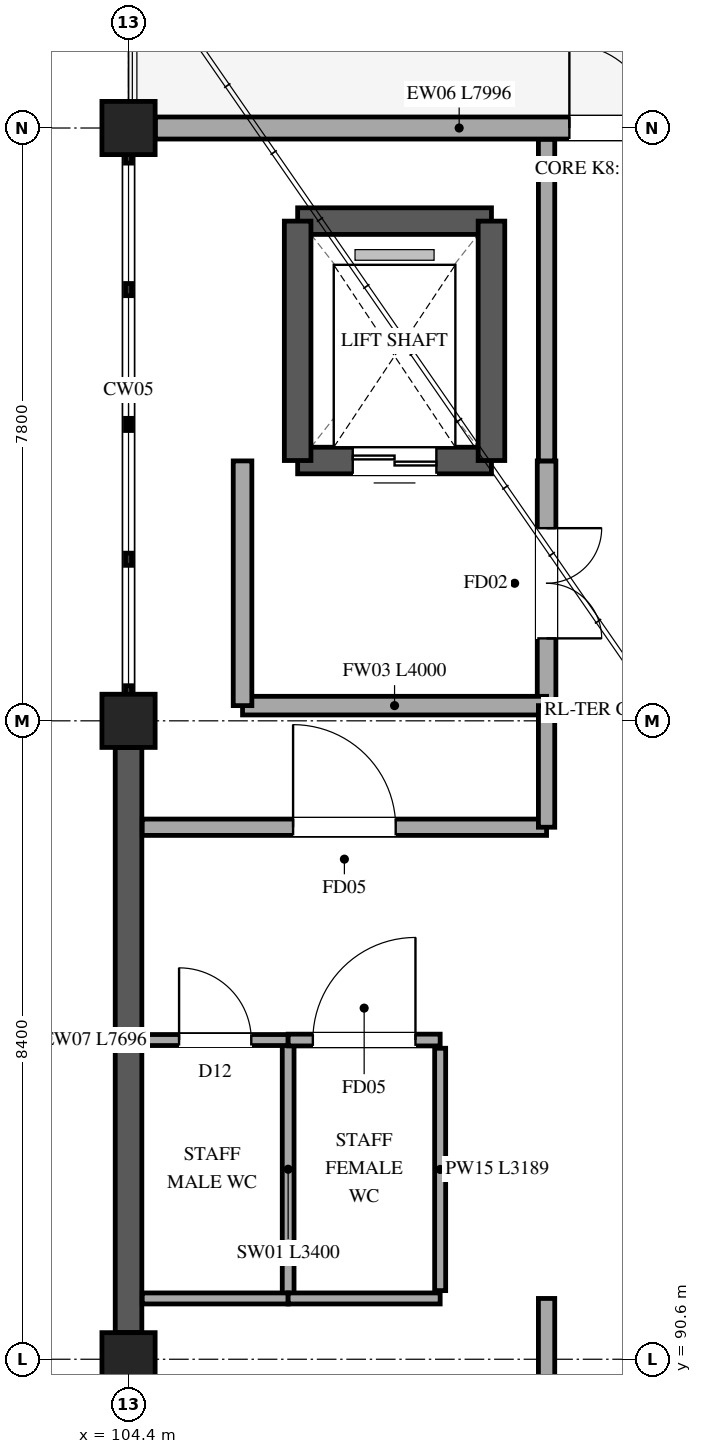
"""IFC4 building model, lengths in metres.
Left out: names, types, materials, properties, quantities, classifications, styles, units other than length and angle.
Written with IfcOpenShell. Run it as: python <this file> out.ifc"""

import sys

from ifc_helpers import new_model, si_unit, direction, frame, frame_2d, origin, origin_2d, place, context, subcontext, project, spatial, rectangle, extrude, element, fill, save


model = new_model("IFC4")
c1 = context("Model", 3, precision=1e-05, world=origin(), true_north=direction((0.0, 1.0)))
c2 = subcontext(c1, "Body", "Model", "MODEL_VIEW")
j1 = project(units=[si_unit("LENGTHUNIT", "METRE"), si_unit("PLANEANGLEUNIT", "RADIAN")], contexts=[c1])
p1 = place(None, origin())
s1 = spatial("IfcSite", under=j1, at=p1, CompositionType="ELEMENT")
p2 = place(p1, origin())
s2 = spatial("IfcBuilding", under=s1, at=p2, CompositionType="ELEMENT")
p3 = place(p2, frame((0.0, 0.0, 26.7)))
s3 = spatial("IfcBuildingStorey", under=s2, at=p3, CompositionType="ELEMENT", Elevation=26.7)
for number, where, z_axis, x_axis in (
    (1, (104.4, 90.6, 0.0), (0.0, 0.0, 1.0), (1.0, 0.0, 0.0)),
    (2, (104.4, 99.0, 0.0), (0.0, 0.0, 1.0), (1.0, 0.0, 0.0)),
    (3, (104.4, 106.8, 0.0), (0.0, 0.0, 1.0), (1.0, 0.0, 0.0)),
):
    element("IfcColumn", number, at=place(p3, frame(where, z_axis=z_axis, x_axis=x_axis)), inside=s3, PredefinedType="COLUMN", context=c2, shape_type="SweptSolid", body=[
        extrude(rectangle(XDim=0.7, YDim=0.7, at=origin_2d()), origin(), (0.0, 0.0, 1.0), 4.8),
    ])
p4 = place(p3, frame((104.4, 90.952, 0.0), z_axis=(0.0, 0.0, 1.0), x_axis=(0.0, 1.0, 0.0)))
e4 = element("IfcWall", 4, at=p4, inside=s3, PredefinedType="STANDARD", context=c2, shape_type="SweptSolid", body=[
    extrude(rectangle(XDim=7.696, YDim=0.35, at=frame_2d((3.848, 0.0))), origin(), (0.0, 0.0, 1.0), 4.49),
])
p5 = place(p3, frame((104.752, 106.8, 0.0), z_axis=(0.0, 0.0, 1.0), x_axis=(1.0, 0.0, 0.0)))
e5 = element("IfcWall", 5, at=p5, inside=s3, PredefinedType="STANDARD", context=c2, shape_type="SweptSolid", body=[
    extrude(rectangle(XDim=7.996, YDim=0.29, at=frame_2d((3.998, 0.0))), origin(), (0.0, 0.0, 1.0), 3.97),
])
p6 = place(p5, frame((5.448, 0.0, 0.0)))
e6 = element("IfcOpeningElement", 6, at=p6, cuts=e5, PredefinedType="OPENING", context=c2, shape_type="SweptSolid", body=[
    extrude(rectangle(XDim=1.1, YDim=2.2, at=frame_2d((0.55, 1.1))), frame((0.0, 0.155, 0.0), z_axis=(0.0, -1.0, 0.0), x_axis=(1.0, 0.0, 0.0)), (0.0, 0.0, 1.0), 0.31),
])
p7 = place(p3, frame((106.625, 105.575, 0.0), z_axis=(0.0, 0.0, 1.0), x_axis=(1.0, 0.0, 0.0)))
e7 = element("IfcWall", 7, at=p7, inside=s3, PredefinedType="SHEAR", context=c2, shape_type="SweptSolid", body=[
    extrude(rectangle(XDim=2.55, YDim=0.35, at=frame_2d((1.275, 0.0))), origin(), (0.0, 0.0, 1.0), 4.8),
])
p8 = place(p3, frame((109.175, 102.425, 0.0), z_axis=(0.0, 0.0, 1.0), x_axis=(-1.0, 0.0, 0.0)))
e8 = element("IfcWall", 8, at=p8, inside=s3, PredefinedType="SHEAR", context=c2, shape_type="SweptSolid", body=[
    extrude(rectangle(XDim=2.55, YDim=0.35, at=frame_2d((1.275, 0.0))), origin(), (0.0, 0.0, 1.0), 4.8),
])
p9 = place(p8, frame((0.725, 0.0, 0.0)))
e9 = element("IfcOpeningElement", 9, at=p9, cuts=e8, PredefinedType="OPENING", context=c2, shape_type="SweptSolid", body=[
    extrude(rectangle(XDim=1.1, YDim=2.2, at=frame_2d((0.55, 1.1))), frame((0.0, 0.185, 0.0), z_axis=(0.0, -1.0, 0.0), x_axis=(1.0, 0.0, 0.0)), (0.0, 0.0, 1.0), 0.37),
])
for number, where, z_axis, x_axis in (
    (10, (106.625, 102.425, 0.0), (0.0, 0.0, 1.0), (0.0, 1.0, 0.0)),
    (11, (109.175, 105.575, 0.0), (0.0, 0.0, 1.0), (0.0, -1.0, 0.0)),
):
    element("IfcWall", number, at=place(p3, frame(where, z_axis=z_axis, x_axis=x_axis)), inside=s3, PredefinedType="SHEAR", context=c2, shape_type="SweptSolid", body=[
        extrude(rectangle(XDim=3.15, YDim=0.35, at=frame_2d((1.575, 0.0))), origin(), (0.0, 0.0, 1.0), 4.8),
    ])
p10 = place(p3, frame((109.9, 102.42, 0.0), z_axis=(0.0, 0.0, 1.0), x_axis=(0.0, -1.0, 0.0)))
e12 = element("IfcWall", 12, at=p10, inside=s3, PredefinedType="STANDARD", context=c2, shape_type="SweptSolid", body=[
    extrude(rectangle(XDim=3.22, YDim=0.245, at=frame_2d((1.61, 0.0))), origin(), (0.0, 0.0, 1.0), 3.775),
])
p11 = place(p10, frame((0.885, 0.0, 0.0)))
e13 = element("IfcOpeningElement", 13, at=p11, cuts=e12, PredefinedType="OPENING", context=c2, shape_type="SweptSolid", body=[
    extrude(rectangle(XDim=1.45, YDim=2.2, at=frame_2d((0.725, 1.1))), frame((0.0, 0.133, 0.0), z_axis=(0.0, -1.0, 0.0), x_axis=(1.0, 0.0, 0.0)), (0.0, 0.0, 1.0), 0.265),
])
p12 = place(p3, frame((109.9, 99.2, 0.0), z_axis=(0.0, 0.0, 1.0), x_axis=(-1.0, 0.0, 0.0)))
e14 = element("IfcWall", 14, at=p12, inside=s3, PredefinedType="STANDARD", context=c2, shape_type="SweptSolid", body=[
    extrude(rectangle(XDim=4.0, YDim=0.245, at=frame_2d((2.0, 0.0))), origin(), (0.0, 0.0, 1.0), 3.775),
])
p13 = place(p3, frame((105.9, 99.2, 0.0), z_axis=(0.0, 0.0, 1.0), x_axis=(0.0, 1.0, 0.0)))
e15 = element("IfcWall", 15, at=p13, inside=s3, PredefinedType="STANDARD", context=c2, shape_type="SweptSolid", body=[
    extrude(rectangle(XDim=3.22, YDim=0.245, at=frame_2d((1.61, 0.0))), origin(), (0.0, 0.0, 1.0), 3.775),
])
p14 = place(p3, frame((106.5, 94.8, 0.0), z_axis=(0.0, 0.0, 1.0), x_axis=(0.0, -1.0, 0.0)))
e16 = element("IfcWall", 16, at=p14, inside=s3, PredefinedType="MOVABLE", context=c2, shape_type="SweptSolid", body=[
    extrude(rectangle(XDim=3.4, YDim=0.155, at=frame_2d((1.7, 0.0))), origin(), (0.0, 0.0, 1.0), 4.46),
])
p15 = place(p3, frame((104.58, 94.8, 0.0), z_axis=(0.0, 0.0, 1.0), x_axis=(1.0, 0.0, 0.0)))
e17 = element("IfcWall", 17, at=p15, inside=s3, PredefinedType="PARTITIONING", context=c2, shape_type="SweptSolid", body=[
    extrude(rectangle(XDim=1.92, YDim=0.145, at=frame_2d((0.96, 0.0))), origin(), (0.0, 0.0, 1.0), 3.975),
])
p16 = place(p15, frame((0.485, 0.0, 0.0)))
e18 = element("IfcOpeningElement", 18, at=p16, cuts=e17, PredefinedType="OPENING", context=c2, shape_type="SweptSolid", body=[
    extrude(rectangle(XDim=0.95, YDim=2.15, at=frame_2d((0.475, 1.075))), frame((0.0, 0.083, 0.0), z_axis=(0.0, -1.0, 0.0), x_axis=(1.0, 0.0, 0.0)), (0.0, 0.0, 1.0), 0.165),
])
p17 = place(p3, frame((106.5, 91.4, 0.0), z_axis=(0.0, 0.0, 1.0), x_axis=(-1.0, 0.0, 0.0)))
e19 = element("IfcWall", 19, at=p17, inside=s3, PredefinedType="PARTITIONING", context=c2, shape_type="SweptSolid", body=[
    extrude(rectangle(XDim=1.92, YDim=0.145, at=frame_2d((0.96, 0.0))), origin(), (0.0, 0.0, 1.0), 3.975),
])
p18 = place(p3, frame((106.5, 94.8, 0.0), z_axis=(0.0, 0.0, 1.0), x_axis=(1.0, 0.0, 0.0)))
e20 = element("IfcWall", 20, at=p18, inside=s3, PredefinedType="MOVABLE", context=c2, shape_type="SweptSolid", body=[
    extrude(rectangle(XDim=2.0, YDim=0.155, at=frame_2d((1.0, 0.0))), origin(), (0.0, 0.0, 1.0), 4.46),
])
p19 = place(p18, frame((0.325, 0.0, 0.0)))
e21 = element("IfcOpeningElement", 21, at=p19, cuts=e20, PredefinedType="OPENING", context=c2, shape_type="SweptSolid", body=[
    extrude(rectangle(XDim=1.35, YDim=2.2, at=frame_2d((0.675, 1.1))), frame((0.0, 0.087, 0.0), z_axis=(0.0, -1.0, 0.0), x_axis=(1.0, 0.0, 0.0)), (0.0, 0.0, 1.0), 0.175),
])
p20 = place(p3, frame((108.5, 91.4, 0.0), z_axis=(0.0, 0.0, 1.0), x_axis=(-1.0, 0.0, 0.0)))
e22 = element("IfcWall", 22, at=p20, inside=s3, PredefinedType="PARTITIONING", context=c2, shape_type="SweptSolid", body=[
    extrude(rectangle(XDim=2.0, YDim=0.145, at=frame_2d((1.0, 0.0))), origin(), (0.0, 0.0, 1.0), 4.46),
])
p21 = place(p3, frame((109.9, 80.7, 0.0), z_axis=(0.0, 0.0, 1.0), x_axis=(0.0, 1.0, 0.0)))
e23 = element("IfcWall", 23, at=p21, inside=s3, PredefinedType="PARTITIONING", context=c2, shape_type="SweptSolid", body=[
    extrude(rectangle(XDim=10.7, YDim=0.215, at=frame_2d((5.35, 0.0))), origin(), (0.0, 0.0, 1.0), 3.775),
])
p22 = place(p21, frame((4.675, 0.0, 0.0)))
e24 = element("IfcOpeningElement", 24, at=p22, cuts=e23, PredefinedType="OPENING", context=c2, shape_type="SweptSolid", body=[
    extrude(rectangle(XDim=1.35, YDim=2.2, at=frame_2d((0.675, 1.1))), frame((0.0, 0.118, 0.0), z_axis=(0.0, -1.0, 0.0), x_axis=(1.0, 0.0, 0.0)), (0.0, 0.0, 1.0), 0.235),
])
p23 = place(p3, frame((104.58, 97.6, 0.0), z_axis=(0.0, 0.0, 1.0), x_axis=(1.0, 0.0, 0.0)))
e25 = element("IfcWall", 25, at=p23, inside=s3, PredefinedType="PARTITIONING", context=c2, shape_type="SweptSolid", body=[
    extrude(rectangle(XDim=5.32, YDim=0.215, at=frame_2d((2.66, 0.0))), origin(), (0.0, 0.0, 1.0), 3.975),
])
p24 = place(p23, frame((1.985, 0.0, 0.0)))
e26 = element("IfcOpeningElement", 26, at=p24, cuts=e25, PredefinedType="OPENING", context=c2, shape_type="SweptSolid", body=[
    extrude(rectangle(XDim=1.35, YDim=2.2, at=frame_2d((0.675, 1.1))), frame((0.0, 0.118, 0.0), z_axis=(0.0, -1.0, 0.0), x_axis=(1.0, 0.0, 0.0)), (0.0, 0.0, 1.0), 0.235),
])
p25 = place(p3, frame((109.9, 97.6, 0.0), z_axis=(0.0, 0.0, 1.0), x_axis=(0.0, 1.0, 0.0)))
e27 = element("IfcWall", 27, at=p25, inside=s3, PredefinedType="PARTITIONING", context=c2, shape_type="SweptSolid", body=[
    extrude(rectangle(XDim=1.6, YDim=0.215, at=frame_2d((0.8, 0.0))), origin(), (0.0, 0.0, 1.0), 3.775),
])
p26 = place(p3, frame((109.9, 102.42, 0.0), z_axis=(0.0, 0.0, 1.0), x_axis=(0.0, 1.0, 0.0)))
e28 = element("IfcWall", 28, at=p26, inside=s3, PredefinedType="PARTITIONING", context=c2, shape_type="SweptSolid", body=[
    extrude(rectangle(XDim=4.23, YDim=0.215, at=frame_2d((2.115, 0.0))), origin(), (0.0, 0.0, 1.0), 3.975),
])
p27 = place(p3, frame((108.5, 94.692, 0.0), z_axis=(0.0, 0.0, 1.0), x_axis=(0.0, -1.0, 0.0)))
e29 = element("IfcWall", 29, at=p27, inside=s3, PredefinedType="PARTITIONING", context=c2, shape_type="SweptSolid", body=[
    extrude(rectangle(XDim=3.189, YDim=0.145, at=frame_2d((1.594, 0.0))), origin(), (0.0, 0.0, 1.0), 4.46),
])
p28 = place(p6, origin())
e30 = element("IfcDoor", 30, at=p28, inside=s3, OperationType="SINGLE_SWING_LEFT", PredefinedType="DOOR", context=c2, shape_type="SweptSolid", body=[
    extrude(rectangle(XDim=1.1, YDim=2.2, at=frame_2d((0.55, 1.1))), frame((0.0, 0.025, 0.0), z_axis=(0.0, -1.0, 0.0), x_axis=(1.0, 0.0, 0.0)), (0.0, 0.0, 1.0), 0.05),
])
fill(e6, e30)
p29 = place(p9, origin())
e31 = element("IfcDoor", 31, at=p29, inside=s3, OperationType="DOUBLE_DOOR_SLIDING", PredefinedType="DOOR", context=c2, shape_type="SweptSolid", body=[
    extrude(rectangle(XDim=1.1, YDim=2.2, at=frame_2d((0.55, 1.1))), frame((0.0, 0.025, 0.0), z_axis=(0.0, -1.0, 0.0), x_axis=(1.0, 0.0, 0.0)), (0.0, 0.0, 1.0), 0.05),
])
fill(e9, e31)
p30 = place(p11, origin())
e32 = element("IfcDoor", 32, at=p30, inside=s3, OperationType="DOUBLE_DOOR_SINGLE_SWING", PredefinedType="DOOR", context=c2, shape_type="SweptSolid", body=[
    extrude(rectangle(XDim=1.45, YDim=2.2, at=frame_2d((0.725, 1.1))), frame((0.0, 0.025, 0.0), z_axis=(0.0, -1.0, 0.0), x_axis=(1.0, 0.0, 0.0)), (0.0, 0.0, 1.0), 0.05),
])
fill(e13, e32)
p31 = place(p16, origin())
e33 = element("IfcDoor", 33, at=p31, inside=s3, OperationType="SINGLE_SWING_LEFT", PredefinedType="DOOR", context=c2, shape_type="SweptSolid", body=[
    extrude(rectangle(XDim=0.95, YDim=2.15, at=frame_2d((0.475, 1.075))), frame((0.0, 0.025, 0.0), z_axis=(0.0, -1.0, 0.0), x_axis=(1.0, 0.0, 0.0)), (0.0, 0.0, 1.0), 0.05),
])
fill(e18, e33)
p32 = place(p19, origin())
e34 = element("IfcDoor", 34, at=p32, inside=s3, OperationType="SINGLE_SWING_RIGHT", PredefinedType="DOOR", context=c2, shape_type="SweptSolid", body=[
    extrude(rectangle(XDim=1.35, YDim=2.2, at=frame_2d((0.675, 1.1))), frame((0.0, 0.025, 0.0), z_axis=(0.0, -1.0, 0.0), x_axis=(1.0, 0.0, 0.0)), (0.0, 0.0, 1.0), 0.05),
])
fill(e21, e34)
p33 = place(p24, origin())
e35 = element("IfcDoor", 35, at=p33, inside=s3, OperationType="SINGLE_SWING_LEFT", PredefinedType="DOOR", context=c2, shape_type="SweptSolid", body=[
    extrude(rectangle(XDim=1.35, YDim=2.2, at=frame_2d((0.675, 1.1))), frame((0.0, 0.025, 0.0), z_axis=(0.0, -1.0, 0.0), x_axis=(1.0, 0.0, 0.0)), (0.0, 0.0, 1.0), 0.05),
])
fill(e26, e35)
save(model, sys.argv[1])
